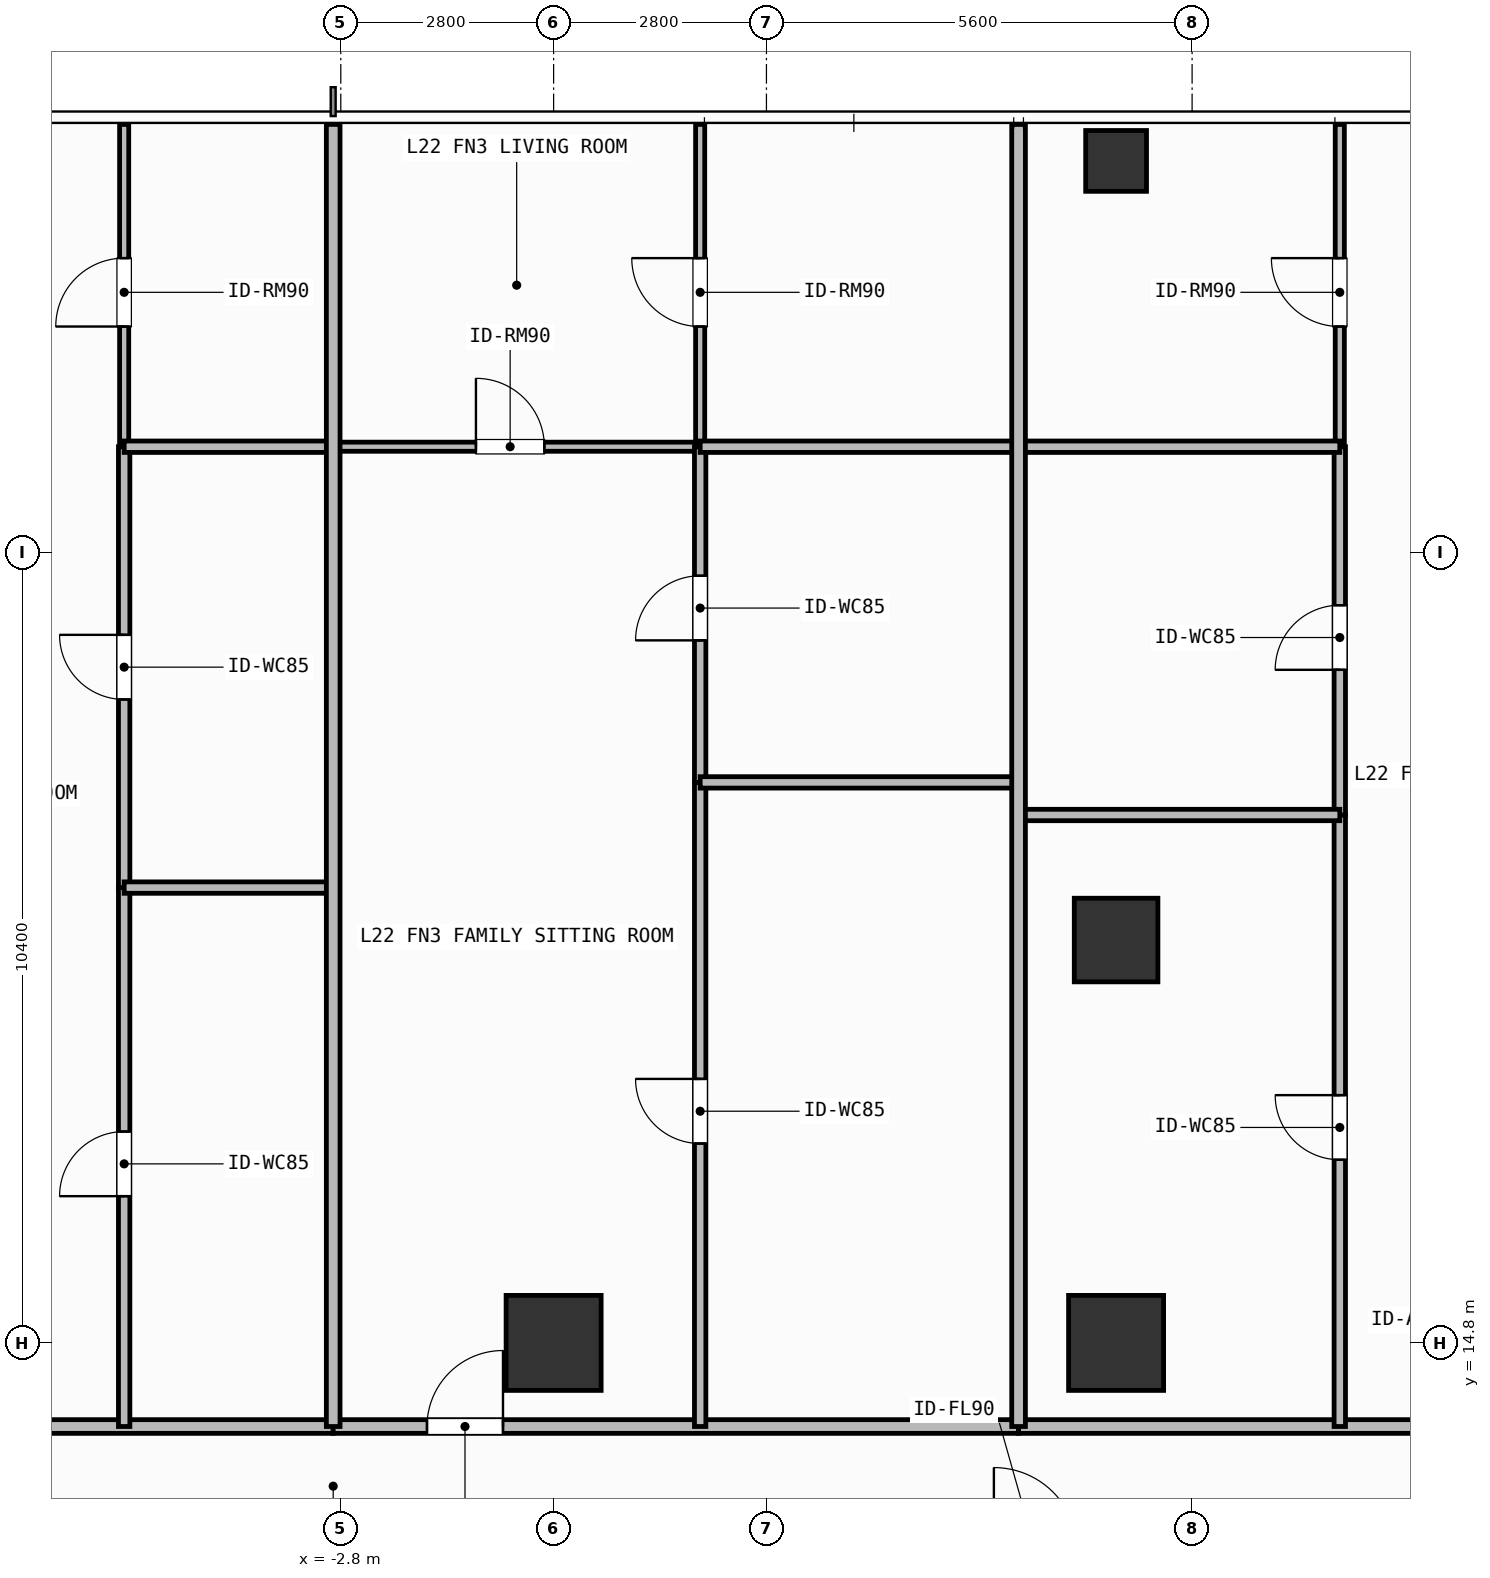
"""IFC4 building model, lengths in metres.
Left out: names, types, materials, properties, quantities, classifications, styles, units other than length and angle.
Written with IfcOpenShell. Run it as: python <this file> out.ifc"""

import sys

from ifc_helpers import new_model, si_unit, direction, frame, frame_2d, origin, origin_2d, place, context, subcontext, project, spatial, rectangle, hollow_rectangle, extrude, element, fill, save


model = new_model("IFC4")
c1 = context("Model", 3, precision=1e-05, world=origin(), true_north=direction((0.0, 1.0)))
c2 = subcontext(c1, "Body", "Model", "MODEL_VIEW")
j1 = project(units=[si_unit("LENGTHUNIT", "METRE"), si_unit("PLANEANGLEUNIT", "RADIAN")], contexts=[c1])
p1 = place(None, origin())
s1 = spatial("IfcSite", under=j1, at=p1, CompositionType="ELEMENT")
p2 = place(p1, origin())
s2 = spatial("IfcBuilding", under=s1, at=p2, CompositionType="ELEMENT")
p3 = place(p2, frame((0.0, 0.0, 89.1)))
s3 = spatial("IfcBuildingStorey", under=s2, at=p3, CompositionType="ELEMENT", Elevation=89.1)
for number, where, z_axis, x_axis in (
    (1, (0.0, 14.8, 0.0), (0.0, 0.0, 1.0), (1.0, 0.0, 0.0)),
    (2, (7.4, 14.8, 0.0), (0.0, 0.0, 1.0), (1.0, 0.0, 0.0)),
):
    element("IfcColumn", number, at=place(p3, frame(where, z_axis=z_axis, x_axis=x_axis)), inside=s3, PredefinedType="COLUMN", context=c2, shape_type="SweptSolid", body=[
        extrude(rectangle(XDim=1.25, YDim=1.25, at=origin_2d()), origin(), (0.0, 0.0, 1.0), 3.9),
    ])
p4 = place(p3, frame((7.4, 20.1, 0.0), z_axis=(0.0, 0.0, 1.0), x_axis=(1.0, 0.0, 0.0)))
e3 = element("IfcColumn", 3, at=p4, inside=s3, PredefinedType="COLUMN", context=c2, shape_type="SweptSolid", body=[
    extrude(rectangle(XDim=1.1, YDim=1.1, at=origin_2d()), origin(), (0.0, 0.0, 1.0), 3.9),
])
p5 = place(p3, frame((7.4, 30.35, 0.0), z_axis=(0.0, 0.0, 1.0), x_axis=(1.0, 0.0, 0.0)))
e4 = element("IfcColumn", 4, at=p5, inside=s3, PredefinedType="COLUMN", context=c2, shape_type="SweptSolid", body=[
    extrude(hollow_rectangle(XDim=0.8, YDim=0.8, WallThickness=0.036, at=origin_2d()), origin(), (0.0, 0.0, 1.0), 3.9),
])
p6 = place(p3, frame((-9.786, 13.7, 0.0), z_axis=(0.0, 0.0, 1.0), x_axis=(1.0, 0.0, 0.0)))
e5 = element("IfcWall", 5, at=p6, inside=s3, PredefinedType="PARTITIONING", context=c2, shape_type="SweptSolid", body=[
    extrude(rectangle(XDim=6.886, YDim=0.18, at=frame_2d((3.443, 0.0))), origin(), (0.0, 0.0, 1.0), 3.68),
])
p7 = place(p6, frame((0.698, 0.0, 0.0)))
e6 = element("IfcOpeningElement", 6, at=p7, cuts=e5, PredefinedType="OPENING", context=c2, shape_type="SweptSolid", body=[
    extrude(rectangle(XDim=1.0, YDim=2.2, at=frame_2d((0.5, 1.1))), frame((0.0, 0.1, 0.0), z_axis=(0.0, -1.0, 0.0), x_axis=(1.0, 0.0, 0.0)), (0.0, 0.0, 1.0), 0.2),
])
p8 = place(p3, frame((-5.65, 13.7, 0.0), z_axis=(0.0, 0.0, 1.0), x_axis=(0.0, 1.0, 0.0)))
e7 = element("IfcWall", 7, at=p8, inside=s3, PredefinedType="PARTITIONING", context=c2, shape_type="SweptSolid", body=[
    extrude(rectangle(XDim=7.09, YDim=0.15, at=frame_2d((3.545, 0.0))), origin(), (0.0, 0.0, 1.0), 3.68),
])
p9 = place(p8, frame((3.03, 0.0, 0.0)))
e8 = element("IfcOpeningElement", 8, at=p9, cuts=e7, PredefinedType="OPENING", context=c2, shape_type="SweptSolid", body=[
    extrude(rectangle(XDim=0.85, YDim=2.1, at=frame_2d((0.425, 1.05))), frame((0.0, 0.085, 0.0), z_axis=(0.0, -1.0, 0.0), x_axis=(1.0, 0.0, 0.0)), (0.0, 0.0, 1.0), 0.17),
])
p10 = place(p3, frame((-5.65, 20.79, 0.0), z_axis=(0.0, 0.0, 1.0), x_axis=(0.0, 1.0, 0.0)))
e9 = element("IfcWall", 9, at=p10, inside=s3, PredefinedType="PARTITIONING", context=c2, shape_type="SweptSolid", body=[
    extrude(rectangle(XDim=5.8, YDim=0.15, at=frame_2d((2.9, 0.0))), origin(), (0.0, 0.0, 1.0), 3.68),
])
p11 = place(p10, frame((2.475, 0.0, 0.0)))
e10 = element("IfcOpeningElement", 10, at=p11, cuts=e9, PredefinedType="OPENING", context=c2, shape_type="SweptSolid", body=[
    extrude(rectangle(XDim=0.85, YDim=2.1, at=frame_2d((0.425, 1.05))), frame((0.0, 0.085, 0.0), z_axis=(0.0, -1.0, 0.0), x_axis=(1.0, 0.0, 0.0)), (0.0, 0.0, 1.0), 0.17),
])
p12 = place(p3, frame((-5.65, 26.59, 0.0), z_axis=(0.0, 0.0, 1.0), x_axis=(0.0, 1.0, 0.0)))
e11 = element("IfcWall", 11, at=p12, inside=s3, PredefinedType="PARTITIONING", context=c2, shape_type="SweptSolid", body=[
    extrude(rectangle(XDim=4.24, YDim=0.12, at=frame_2d((2.12, 0.0))), origin(), (0.0, 0.0, 1.0), 3.68),
])
p13 = place(p12, frame((1.581, 0.0, 0.0)))
e12 = element("IfcOpeningElement", 12, at=p13, cuts=e11, PredefinedType="OPENING", context=c2, shape_type="SweptSolid", body=[
    extrude(rectangle(XDim=0.9, YDim=2.1, at=frame_2d((0.45, 1.05))), frame((0.0, 0.07, 0.0), z_axis=(0.0, -1.0, 0.0), x_axis=(1.0, 0.0, 0.0)), (0.0, 0.0, 1.0), 0.14),
])
p14 = place(p3, frame((-2.9, 13.7, 0.0), z_axis=(0.0, 0.0, 1.0), x_axis=(1.0, 0.0, 0.0)))
e13 = element("IfcWall", 13, at=p14, inside=s3, PredefinedType="PARTITIONING", context=c2, shape_type="SweptSolid", body=[
    extrude(rectangle(XDim=9.017, YDim=0.18, at=frame_2d((4.508, 0.0))), origin(), (0.0, 0.0, 1.0), 3.68),
])
p15 = place(p14, frame((1.234, 0.0, 0.0)))
e14 = element("IfcOpeningElement", 14, at=p15, cuts=e13, PredefinedType="OPENING", context=c2, shape_type="SweptSolid", body=[
    extrude(rectangle(XDim=1.0, YDim=2.2, at=frame_2d((0.5, 1.1))), frame((0.0, 0.1, 0.0), z_axis=(0.0, -1.0, 0.0), x_axis=(1.0, 0.0, 0.0)), (0.0, 0.0, 1.0), 0.2),
])
p16 = place(p3, frame((-2.9, 26.59, 0.0), z_axis=(0.0, 0.0, 1.0), x_axis=(1.0, 0.0, 0.0)))
e15 = element("IfcWall", 15, at=p16, inside=s3, PredefinedType="PARTITIONING", context=c2, shape_type="SweptSolid", body=[
    extrude(rectangle(XDim=4.828, YDim=0.12, at=frame_2d((2.414, 0.0))), origin(), (0.0, 0.0, 1.0), 3.68),
])
p17 = place(p16, frame((1.878, 0.0, 0.0)))
e16 = element("IfcOpeningElement", 16, at=p17, cuts=e15, PredefinedType="OPENING", context=c2, shape_type="SweptSolid", body=[
    extrude(rectangle(XDim=0.9, YDim=2.1, at=frame_2d((0.45, 1.05))), frame((0.0, 0.07, 0.0), z_axis=(0.0, -1.0, 0.0), x_axis=(1.0, 0.0, 0.0)), (0.0, 0.0, 1.0), 0.14),
])
p18 = place(p3, frame((1.928, 13.7, 0.0), z_axis=(0.0, 0.0, 1.0), x_axis=(0.0, 1.0, 0.0)))
e17 = element("IfcWall", 17, at=p18, inside=s3, PredefinedType="PARTITIONING", context=c2, shape_type="SweptSolid", body=[
    extrude(rectangle(XDim=8.474, YDim=0.15, at=frame_2d((4.237, 0.0))), origin(), (0.0, 0.0, 1.0), 3.68),
])
p19 = place(p18, frame((3.723, 0.0, 0.0)))
e18 = element("IfcOpeningElement", 18, at=p19, cuts=e17, PredefinedType="OPENING", context=c2, shape_type="SweptSolid", body=[
    extrude(rectangle(XDim=0.85, YDim=2.1, at=frame_2d((0.425, 1.05))), frame((0.0, 0.085, 0.0), z_axis=(0.0, -1.0, 0.0), x_axis=(1.0, 0.0, 0.0)), (0.0, 0.0, 1.0), 0.17),
])
p20 = place(p3, frame((1.928, 22.174, 0.0), z_axis=(0.0, 0.0, 1.0), x_axis=(0.0, 1.0, 0.0)))
e19 = element("IfcWall", 19, at=p20, inside=s3, PredefinedType="PARTITIONING", context=c2, shape_type="SweptSolid", body=[
    extrude(rectangle(XDim=4.416, YDim=0.15, at=frame_2d((2.208, 0.0))), origin(), (0.0, 0.0, 1.0), 3.68),
])
p21 = place(p20, frame((1.868, 0.0, 0.0)))
e20 = element("IfcOpeningElement", 20, at=p21, cuts=e19, PredefinedType="OPENING", context=c2, shape_type="SweptSolid", body=[
    extrude(rectangle(XDim=0.85, YDim=2.1, at=frame_2d((0.425, 1.05))), frame((0.0, 0.085, 0.0), z_axis=(0.0, -1.0, 0.0), x_axis=(1.0, 0.0, 0.0)), (0.0, 0.0, 1.0), 0.17),
])
p22 = place(p3, frame((1.928, 26.59, 0.0), z_axis=(0.0, 0.0, 1.0), x_axis=(0.0, 1.0, 0.0)))
e21 = element("IfcWall", 21, at=p22, inside=s3, PredefinedType="PARTITIONING", context=c2, shape_type="SweptSolid", body=[
    extrude(rectangle(XDim=4.24, YDim=0.12, at=frame_2d((2.12, 0.0))), origin(), (0.0, 0.0, 1.0), 3.68),
])
p23 = place(p22, frame((1.581, 0.0, 0.0)))
e22 = element("IfcOpeningElement", 22, at=p23, cuts=e21, PredefinedType="OPENING", context=c2, shape_type="SweptSolid", body=[
    extrude(rectangle(XDim=0.9, YDim=2.1, at=frame_2d((0.45, 1.05))), frame((0.0, 0.07, 0.0), z_axis=(0.0, -1.0, 0.0), x_axis=(1.0, 0.0, 0.0)), (0.0, 0.0, 1.0), 0.14),
])
p24 = place(p3, frame((6.117, 13.7, 0.0), z_axis=(0.0, 0.0, 1.0), x_axis=(1.0, 0.0, 0.0)))
e23 = element("IfcWall", 23, at=p24, inside=s3, PredefinedType="PARTITIONING", context=c2, shape_type="SweptSolid", body=[
    extrude(rectangle(XDim=12.503, YDim=0.18, at=frame_2d((6.251, 0.0))), origin(), (0.0, 0.0, 1.0), 3.68),
])
p25 = place(p24, frame((5.485, 0.0, 0.0)))
e24 = element("IfcOpeningElement", 24, at=p25, cuts=e23, PredefinedType="OPENING", context=c2, shape_type="SweptSolid", body=[
    extrude(rectangle(XDim=1.0, YDim=2.2, at=frame_2d((0.5, 1.1))), frame((0.0, 0.1, 0.0), z_axis=(0.0, -1.0, 0.0), x_axis=(1.0, 0.0, 0.0)), (0.0, 0.0, 1.0), 0.2),
])
p26 = place(p3, frame((10.343, 13.7, 0.0), z_axis=(0.0, 0.0, 1.0), x_axis=(0.0, 1.0, 0.0)))
e25 = element("IfcWall", 25, at=p26, inside=s3, PredefinedType="PARTITIONING", context=c2, shape_type="SweptSolid", body=[
    extrude(rectangle(XDim=8.045, YDim=0.15, at=frame_2d((4.022, 0.0))), origin(), (0.0, 0.0, 1.0), 3.68),
])
p27 = place(p26, frame((3.51, 0.0, 0.0)))
e26 = element("IfcOpeningElement", 26, at=p27, cuts=e25, PredefinedType="OPENING", context=c2, shape_type="SweptSolid", body=[
    extrude(rectangle(XDim=0.85, YDim=2.1, at=frame_2d((0.425, 1.05))), frame((0.0, 0.085, 0.0), z_axis=(0.0, -1.0, 0.0), x_axis=(1.0, 0.0, 0.0)), (0.0, 0.0, 1.0), 0.17),
])
p28 = place(p3, frame((10.343, 21.745, 0.0), z_axis=(0.0, 0.0, 1.0), x_axis=(0.0, 1.0, 0.0)))
e27 = element("IfcWall", 27, at=p28, inside=s3, PredefinedType="PARTITIONING", context=c2, shape_type="SweptSolid", body=[
    extrude(rectangle(XDim=4.845, YDim=0.15, at=frame_2d((2.422, 0.0))), origin(), (0.0, 0.0, 1.0), 3.68),
])
p29 = place(p28, frame((1.91, 0.0, 0.0)))
e28 = element("IfcOpeningElement", 28, at=p29, cuts=e27, PredefinedType="OPENING", context=c2, shape_type="SweptSolid", body=[
    extrude(rectangle(XDim=0.85, YDim=2.1, at=frame_2d((0.425, 1.05))), frame((0.0, 0.085, 0.0), z_axis=(0.0, -1.0, 0.0), x_axis=(1.0, 0.0, 0.0)), (0.0, 0.0, 1.0), 0.17),
])
p30 = place(p3, frame((10.343, 26.59, 0.0), z_axis=(0.0, 0.0, 1.0), x_axis=(0.0, 1.0, 0.0)))
e29 = element("IfcWall", 29, at=p30, inside=s3, PredefinedType="PARTITIONING", context=c2, shape_type="SweptSolid", body=[
    extrude(rectangle(XDim=4.24, YDim=0.12, at=frame_2d((2.12, 0.0))), origin(), (0.0, 0.0, 1.0), 3.68),
])
p31 = place(p30, frame((1.581, 0.0, 0.0)))
e30 = element("IfcOpeningElement", 30, at=p31, cuts=e29, PredefinedType="OPENING", context=c2, shape_type="SweptSolid", body=[
    extrude(rectangle(XDim=0.9, YDim=2.1, at=frame_2d((0.45, 1.05))), frame((0.0, 0.07, 0.0), z_axis=(0.0, -1.0, 0.0), x_axis=(1.0, 0.0, 0.0)), (0.0, 0.0, 1.0), 0.14),
])
for number, where, z_axis, x_axis in (
    (31, (-5.65, 20.79, 0.0), (0.0, 0.0, 1.0), (1.0, 0.0, 0.0)),
    (32, (-5.65, 26.59, 0.0), (0.0, 0.0, 1.0), (1.0, 0.0, 0.0)),
):
    element("IfcWall", number, at=place(p3, frame(where, z_axis=z_axis, x_axis=x_axis)), inside=s3, PredefinedType="PARTITIONING", context=c2, shape_type="SweptSolid", body=[
        extrude(rectangle(XDim=2.75, YDim=0.15, at=frame_2d((1.375, 0.0))), origin(), (0.0, 0.0, 1.0), 3.68),
    ])
for number, where, z_axis, x_axis in (
    (33, (1.928, 22.174, 0.0), (0.0, 0.0, 1.0), (1.0, 0.0, 0.0)),
    (34, (1.928, 26.59, 0.0), (0.0, 0.0, 1.0), (1.0, 0.0, 0.0)),
):
    element("IfcWall", number, at=place(p3, frame(where, z_axis=z_axis, x_axis=x_axis)), inside=s3, PredefinedType="PARTITIONING", context=c2, shape_type="SweptSolid", body=[
        extrude(rectangle(XDim=4.189, YDim=0.15, at=frame_2d((2.094, 0.0))), origin(), (0.0, 0.0, 1.0), 3.68),
    ])
p32 = place(p3, frame((-2.9, 13.7, 0.0), z_axis=(0.0, 0.0, 1.0), x_axis=(0.0, 1.0, 0.0)))
e35 = element("IfcWall", 35, at=p32, inside=s3, PredefinedType="PARTITIONING", context=c2, shape_type="SweptSolid", body=[
    extrude(rectangle(XDim=17.13, YDim=0.18, at=frame_2d((8.565, 0.0))), origin(), (0.0, 0.0, 1.0), 3.68),
])
for number, where, z_axis, x_axis in (
    (36, (6.117, 21.745, 0.0), (0.0, 0.0, 1.0), (1.0, 0.0, 0.0)),
    (37, (6.117, 26.59, 0.0), (0.0, 0.0, 1.0), (1.0, 0.0, 0.0)),
):
    element("IfcWall", number, at=place(p3, frame(where, z_axis=z_axis, x_axis=x_axis)), inside=s3, PredefinedType="PARTITIONING", context=c2, shape_type="SweptSolid", body=[
        extrude(rectangle(XDim=4.226, YDim=0.15, at=frame_2d((2.113, 0.0))), origin(), (0.0, 0.0, 1.0), 3.68),
    ])
p33 = place(p3, frame((6.117, 13.7, 0.0), z_axis=(0.0, 0.0, 1.0), x_axis=(0.0, 1.0, 0.0)))
e38 = element("IfcWall", 38, at=p33, inside=s3, PredefinedType="PARTITIONING", context=c2, shape_type="SweptSolid", body=[
    extrude(rectangle(XDim=17.13, YDim=0.18, at=frame_2d((8.565, 0.0))), origin(), (0.0, 0.0, 1.0), 3.68),
])
p34 = place(p9, origin())
e39 = element("IfcDoor", 39, at=p34, inside=s3, OperationType="SINGLE_SWING_LEFT", PredefinedType="DOOR", context=c2, shape_type="SweptSolid", body=[
    extrude(rectangle(XDim=0.85, YDim=2.1, at=frame_2d((0.425, 1.05))), frame((0.0, 0.025, 0.0), z_axis=(0.0, -1.0, 0.0), x_axis=(1.0, 0.0, 0.0)), (0.0, 0.0, 1.0), 0.05),
])
fill(e8, e39)
p35 = place(p11, origin())
e40 = element("IfcDoor", 40, at=p35, inside=s3, OperationType="SINGLE_SWING_RIGHT", PredefinedType="DOOR", context=c2, shape_type="SweptSolid", body=[
    extrude(rectangle(XDim=0.85, YDim=2.1, at=frame_2d((0.425, 1.05))), frame((0.0, 0.025, 0.0), z_axis=(0.0, -1.0, 0.0), x_axis=(1.0, 0.0, 0.0)), (0.0, 0.0, 1.0), 0.05),
])
fill(e10, e40)
p36 = place(p13, origin())
e41 = element("IfcDoor", 41, at=p36, inside=s3, OperationType="SINGLE_SWING_LEFT", PredefinedType="DOOR", context=c2, shape_type="SweptSolid", body=[
    extrude(rectangle(XDim=0.9, YDim=2.1, at=frame_2d((0.45, 1.05))), frame((0.0, 0.025, 0.0), z_axis=(0.0, -1.0, 0.0), x_axis=(1.0, 0.0, 0.0)), (0.0, 0.0, 1.0), 0.05),
])
fill(e12, e41)
p37 = place(p15, origin())
e42 = element("IfcDoor", 42, at=p37, inside=s3, OperationType="SINGLE_SWING_RIGHT", PredefinedType="DOOR", context=c2, shape_type="SweptSolid", body=[
    extrude(rectangle(XDim=1.0, YDim=2.2, at=frame_2d((0.5, 1.1))), frame((0.0, 0.025, 0.0), z_axis=(0.0, -1.0, 0.0), x_axis=(1.0, 0.0, 0.0)), (0.0, 0.0, 1.0), 0.05),
])
fill(e14, e42)
p38 = place(p17, origin())
e43 = element("IfcDoor", 43, at=p38, inside=s3, OperationType="SINGLE_SWING_LEFT", PredefinedType="DOOR", context=c2, shape_type="SweptSolid", body=[
    extrude(rectangle(XDim=0.9, YDim=2.1, at=frame_2d((0.45, 1.05))), frame((0.0, 0.025, 0.0), z_axis=(0.0, -1.0, 0.0), x_axis=(1.0, 0.0, 0.0)), (0.0, 0.0, 1.0), 0.05),
])
fill(e16, e43)
p39 = place(p19, origin())
e44 = element("IfcDoor", 44, at=p39, inside=s3, OperationType="SINGLE_SWING_RIGHT", PredefinedType="DOOR", context=c2, shape_type="SweptSolid", body=[
    extrude(rectangle(XDim=0.85, YDim=2.1, at=frame_2d((0.425, 1.05))), frame((0.0, 0.025, 0.0), z_axis=(0.0, -1.0, 0.0), x_axis=(1.0, 0.0, 0.0)), (0.0, 0.0, 1.0), 0.05),
])
fill(e18, e44)
p40 = place(p21, origin())
e45 = element("IfcDoor", 45, at=p40, inside=s3, OperationType="SINGLE_SWING_LEFT", PredefinedType="DOOR", context=c2, shape_type="SweptSolid", body=[
    extrude(rectangle(XDim=0.85, YDim=2.1, at=frame_2d((0.425, 1.05))), frame((0.0, 0.025, 0.0), z_axis=(0.0, -1.0, 0.0), x_axis=(1.0, 0.0, 0.0)), (0.0, 0.0, 1.0), 0.05),
])
fill(e20, e45)
p41 = place(p23, origin())
e46 = element("IfcDoor", 46, at=p41, inside=s3, OperationType="SINGLE_SWING_RIGHT", PredefinedType="DOOR", context=c2, shape_type="SweptSolid", body=[
    extrude(rectangle(XDim=0.9, YDim=2.1, at=frame_2d((0.45, 1.05))), frame((0.0, 0.025, 0.0), z_axis=(0.0, -1.0, 0.0), x_axis=(1.0, 0.0, 0.0)), (0.0, 0.0, 1.0), 0.05),
])
fill(e22, e46)
p42 = place(p27, origin())
e47 = element("IfcDoor", 47, at=p42, inside=s3, OperationType="SINGLE_SWING_RIGHT", PredefinedType="DOOR", context=c2, shape_type="SweptSolid", body=[
    extrude(rectangle(XDim=0.85, YDim=2.1, at=frame_2d((0.425, 1.05))), frame((0.0, 0.025, 0.0), z_axis=(0.0, -1.0, 0.0), x_axis=(1.0, 0.0, 0.0)), (0.0, 0.0, 1.0), 0.05),
])
fill(e26, e47)
p43 = place(p29, origin())
e48 = element("IfcDoor", 48, at=p43, inside=s3, OperationType="SINGLE_SWING_LEFT", PredefinedType="DOOR", context=c2, shape_type="SweptSolid", body=[
    extrude(rectangle(XDim=0.85, YDim=2.1, at=frame_2d((0.425, 1.05))), frame((0.0, 0.025, 0.0), z_axis=(0.0, -1.0, 0.0), x_axis=(1.0, 0.0, 0.0)), (0.0, 0.0, 1.0), 0.05),
])
fill(e28, e48)
p44 = place(p31, origin())
e49 = element("IfcDoor", 49, at=p44, inside=s3, OperationType="SINGLE_SWING_RIGHT", PredefinedType="DOOR", context=c2, shape_type="SweptSolid", body=[
    extrude(rectangle(XDim=0.9, YDim=2.1, at=frame_2d((0.45, 1.05))), frame((0.0, 0.025, 0.0), z_axis=(0.0, -1.0, 0.0), x_axis=(1.0, 0.0, 0.0)), (0.0, 0.0, 1.0), 0.05),
])
fill(e30, e49)
save(model, sys.argv[1])
